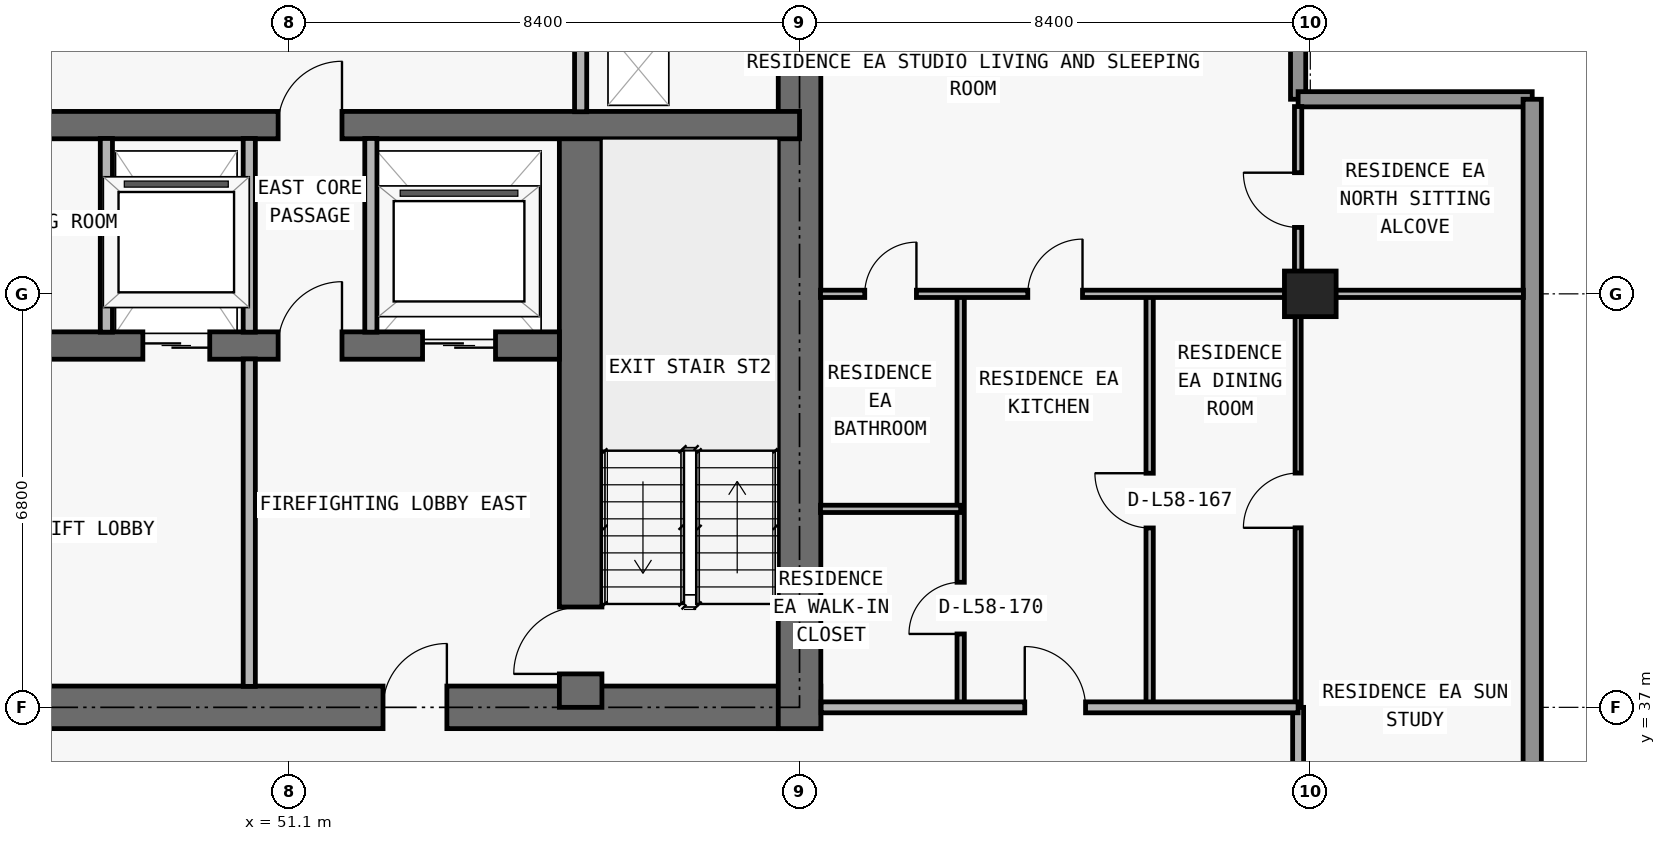
"""IFC4 building model, lengths in metres.
Left out: names, types, materials, properties, quantities, classifications, styles, units other than length and angle.
Written with IfcOpenShell. Run it as: python <this file> out.ifc"""

import sys

from ifc_helpers import new_model, si_unit, direction, frame, frame_2d, origin, origin_2d, place, context, subcontext, project, spatial, rectangle, extrude, element, fill, save


model = new_model("IFC4")
c1 = context("Model", 3, precision=1e-05, world=origin(), true_north=direction((0.0, 1.0)))
c2 = subcontext(c1, "Body", "Model", "MODEL_VIEW")
j1 = project(units=[si_unit("LENGTHUNIT", "METRE"), si_unit("PLANEANGLEUNIT", "RADIAN")], contexts=[c1])
p1 = place(None, origin())
s1 = spatial("IfcSite", under=j1, at=p1, CompositionType="ELEMENT")
p2 = place(p1, origin())
s2 = spatial("IfcBuilding", under=s1, at=p2, CompositionType="ELEMENT")
p3 = place(p2, frame((0.0, 0.0, 208.2)))
s3 = spatial("IfcBuildingStorey", under=s2, at=p3, CompositionType="ELEMENT", Elevation=208.2)
p4 = place(p3, frame((67.9, 43.8, 0.0), z_axis=(0.0, 0.0, 1.0), x_axis=(1.0, 0.0, 0.0)))
e1 = element("IfcColumn", 1, at=p4, inside=s3, PredefinedType="COLUMN", context=c2, shape_type="SweptSolid", body=[
    extrude(rectangle(XDim=0.85, YDim=0.75, at=origin_2d()), origin(), (0.0, 0.0, 1.0), 3.05),
])
p5 = place(p3, frame((17.95, 37.0, 0.0), z_axis=(0.0, 0.0, 1.0), x_axis=(1.0, 0.0, 0.0)))
e2 = element("IfcWall", 2, at=p5, inside=s3, PredefinedType="SHEAR", context=c2, shape_type="SweptSolid", body=[
    extrude(rectangle(XDim=41.9, YDim=0.7, at=frame_2d((20.95, 0.0))), origin(), (0.0, 0.0, 1.0), 3.05),
])
p6 = place(p5, frame((14.35, 0.0, 0.0)))
e3 = element("IfcOpeningElement", 3, at=p6, cuts=e2, PredefinedType="OPENING", context=c2, shape_type="SweptSolid", body=[
    extrude(rectangle(XDim=1.1, YDim=2.15, at=frame_2d((0.55, 1.075))), frame((0.0, 0.36, 0.0), z_axis=(0.0, -1.0, 0.0), x_axis=(1.0, 0.0, 0.0)), (0.0, 0.0, 1.0), 0.72),
])
p7 = place(p5, frame((6.2, 0.0, 0.0)))
e4 = element("IfcOpeningElement", 4, at=p7, cuts=e2, PredefinedType="OPENING", context=c2, shape_type="SweptSolid", body=[
    extrude(rectangle(XDim=1.05, YDim=2.15, at=frame_2d((0.525, 1.075))), frame((0.0, 0.36, 0.0), z_axis=(0.0, -1.0, 0.0), x_axis=(1.0, 0.0, 0.0)), (0.0, 0.0, 1.0), 0.72),
])
p8 = place(p5, frame((34.7, 0.0, 0.0)))
e5 = element("IfcOpeningElement", 5, at=p8, cuts=e2, PredefinedType="OPENING", context=c2, shape_type="SweptSolid", body=[
    extrude(rectangle(XDim=1.05, YDim=2.15, at=frame_2d((0.525, 1.075))), frame((0.0, 0.36, 0.0), z_axis=(0.0, -1.0, 0.0), x_axis=(1.0, 0.0, 0.0)), (0.0, 0.0, 1.0), 0.72),
])
p9 = place(p5, frame((10.812, 0.0, 0.0)))
e6 = element("IfcOpeningElement", 6, at=p9, cuts=e2, PredefinedType="OPENING", context=c2, shape_type="SweptSolid", body=[
    extrude(rectangle(XDim=1.05, YDim=2.15, at=frame_2d((0.525, 1.075))), frame((0.0, 0.36, 0.0), z_axis=(0.0, -1.0, 0.0), x_axis=(1.0, 0.0, 0.0)), (0.0, 0.0, 1.0), 0.72),
])
p10 = place(p5, frame((24.05, 0.0, 0.0)))
e7 = element("IfcOpeningElement", 7, at=p10, cuts=e2, PredefinedType="OPENING", context=c2, shape_type="SweptSolid", body=[
    extrude(rectangle(XDim=1.05, YDim=2.15, at=frame_2d((0.525, 1.075))), frame((0.0, 0.36, 0.0), z_axis=(0.0, -1.0, 0.0), x_axis=(1.0, 0.0, 0.0)), (0.0, 0.0, 1.0), 0.72),
])
p11 = place(p3, frame((59.5, 36.65, 0.0), z_axis=(0.0, 0.0, 1.0), x_axis=(0.0, 1.0, 0.0)))
e8 = element("IfcWall", 8, at=p11, inside=s3, PredefinedType="SHEAR", context=c2, shape_type="SweptSolid", body=[
    extrude(rectangle(XDim=13.95, YDim=0.7, at=frame_2d((6.975, 0.0))), origin(), (0.0, 0.0, 1.0), 3.05),
])
p12 = place(p3, frame((55.9, 37.0, 0.0), z_axis=(0.0, 0.0, 1.0), x_axis=(0.0, 1.0, 0.0)))
e9 = element("IfcWall", 9, at=p12, inside=s3, PredefinedType="SHEAR", context=c2, shape_type="SweptSolid", body=[
    extrude(rectangle(XDim=9.575, YDim=0.7, at=frame_2d((4.788, 0.0))), origin(), (0.0, 0.0, 1.0), 3.05),
])
p13 = place(p12, frame((0.55, 0.0, 0.0)))
e10 = element("IfcOpeningElement", 10, at=p13, cuts=e9, PredefinedType="OPENING", context=c2, shape_type="SweptSolid", body=[
    extrude(rectangle(XDim=1.1, YDim=2.15, at=frame_2d((0.55, 1.075))), frame((0.0, 0.36, 0.0), z_axis=(0.0, -1.0, 0.0), x_axis=(1.0, 0.0, 0.0)), (0.0, 0.0, 1.0), 0.72),
])
p14 = place(p3, frame((22.25, 42.95, 0.0), z_axis=(0.0, 0.0, 1.0), x_axis=(1.0, 0.0, 0.0)))
e11 = element("IfcWall", 11, at=p14, inside=s3, PredefinedType="SHEAR", context=c2, shape_type="SweptSolid", body=[
    extrude(rectangle(XDim=33.3, YDim=0.45, at=frame_2d((16.65, 0.0))), origin(), (0.0, 0.0, 1.0), 3.05),
])
p15 = place(p14, frame((1.05, 0.0, 0.0)))
e12 = element("IfcOpeningElement", 12, at=p15, cuts=e11, PredefinedType="OPENING", context=c2, shape_type="SweptSolid", body=[
    extrude(rectangle(XDim=1.2, YDim=2.2, at=frame_2d((0.6, 1.1))), frame((0.0, 0.235, 0.0), z_axis=(0.0, -1.0, 0.0), x_axis=(1.0, 0.0, 0.0)), (0.0, 0.0, 1.0), 0.47),
])
p16 = place(p14, frame((31.05, 0.0, 0.0)))
e13 = element("IfcOpeningElement", 13, at=p16, cuts=e11, PredefinedType="OPENING", context=c2, shape_type="SweptSolid", body=[
    extrude(rectangle(XDim=1.2, YDim=2.2, at=frame_2d((0.6, 1.1))), frame((0.0, 0.235, 0.0), z_axis=(0.0, -1.0, 0.0), x_axis=(1.0, 0.0, 0.0)), (0.0, 0.0, 1.0), 0.47),
])
p17 = place(p14, frame((26.45, 0.0, 0.0)))
e14 = element("IfcOpeningElement", 14, at=p17, cuts=e11, PredefinedType="OPENING", context=c2, shape_type="SweptSolid", body=[
    extrude(rectangle(XDim=1.1, YDim=2.2, at=frame_2d((0.55, 1.1))), frame((0.0, 0.235, 0.0), z_axis=(0.0, -1.0, 0.0), x_axis=(1.0, 0.0, 0.0)), (0.0, 0.0, 1.0), 0.47),
])
p18 = place(p14, frame((5.95, 0.0, 0.0)))
e15 = element("IfcOpeningElement", 15, at=p18, cuts=e11, PredefinedType="OPENING", context=c2, shape_type="SweptSolid", body=[
    extrude(rectangle(XDim=1.1, YDim=2.2, at=frame_2d((0.55, 1.1))), frame((0.0, 0.235, 0.0), z_axis=(0.0, -1.0, 0.0), x_axis=(1.0, 0.0, 0.0)), (0.0, 0.0, 1.0), 0.47),
])
p19 = place(p14, frame((3.625, 0.0, 0.0)))
e16 = element("IfcOpeningElement", 16, at=p19, cuts=e11, PredefinedType="OPENING", context=c2, shape_type="SweptSolid", body=[
    extrude(rectangle(XDim=1.05, YDim=2.15, at=frame_2d((0.525, 1.075))), frame((0.0, 0.235, 0.0), z_axis=(0.0, -1.0, 0.0), x_axis=(1.0, 0.0, 0.0)), (0.0, 0.0, 1.0), 0.47),
])
p20 = place(p14, frame((28.675, 0.0, 0.0)))
e17 = element("IfcOpeningElement", 17, at=p20, cuts=e11, PredefinedType="OPENING", context=c2, shape_type="SweptSolid", body=[
    extrude(rectangle(XDim=1.05, YDim=2.15, at=frame_2d((0.525, 1.075))), frame((0.0, 0.235, 0.0), z_axis=(0.0, -1.0, 0.0), x_axis=(1.0, 0.0, 0.0)), (0.0, 0.0, 1.0), 0.47),
])
p21 = place(p14, frame((15.225, 0.0, 0.0)))
e18 = element("IfcOpeningElement", 18, at=p21, cuts=e11, PredefinedType="OPENING", context=c2, shape_type="SweptSolid", body=[
    extrude(rectangle(XDim=1.0, YDim=2.2, at=frame_2d((0.5, 1.1))), frame((0.0, 0.235, 0.0), z_axis=(0.0, -1.0, 0.0), x_axis=(1.0, 0.0, 0.0)), (0.0, 0.0, 1.0), 0.47),
])
p22 = place(p14, frame((21.975, 0.0, 0.0)))
e19 = element("IfcOpeningElement", 19, at=p22, cuts=e11, PredefinedType="OPENING", context=c2, shape_type="SweptSolid", body=[
    extrude(rectangle(XDim=1.0, YDim=2.2, at=frame_2d((0.5, 1.1))), frame((0.0, 0.235, 0.0), z_axis=(0.0, -1.0, 0.0), x_axis=(1.0, 0.0, 0.0)), (0.0, 0.0, 1.0), 0.47),
])
p23 = place(p3, frame((18.3, 46.575, 0.0), z_axis=(0.0, 0.0, 1.0), x_axis=(1.0, 0.0, 0.0)))
e20 = element("IfcWall", 20, at=p23, inside=s3, PredefinedType="SHEAR", context=c2, shape_type="SweptSolid", body=[
    extrude(rectangle(XDim=41.2, YDim=0.45, at=frame_2d((20.6, 0.0))), origin(), (0.0, 0.0, 1.0), 3.05),
])
p24 = place(p23, frame((7.575, 0.0, 0.0)))
e21 = element("IfcOpeningElement", 21, at=p24, cuts=e20, PredefinedType="OPENING", context=c2, shape_type="SweptSolid", body=[
    extrude(rectangle(XDim=1.05, YDim=2.15, at=frame_2d((0.525, 1.075))), frame((0.0, 0.235, 0.0), z_axis=(0.0, -1.0, 0.0), x_axis=(1.0, 0.0, 0.0)), (0.0, 0.0, 1.0), 0.47),
])
p25 = place(p23, frame((32.625, 0.0, 0.0)))
e22 = element("IfcOpeningElement", 22, at=p25, cuts=e20, PredefinedType="OPENING", context=c2, shape_type="SweptSolid", body=[
    extrude(rectangle(XDim=1.05, YDim=2.15, at=frame_2d((0.525, 1.075))), frame((0.0, 0.235, 0.0), z_axis=(0.0, -1.0, 0.0), x_axis=(1.0, 0.0, 0.0)), (0.0, 0.0, 1.0), 0.47),
])
p26 = place(p3, frame((67.7, 50.45, 0.0), z_axis=(0.0, 0.0, 1.0), x_axis=(0.0, -1.0, 0.0)))
e23 = element("IfcWall", 23, at=p26, inside=s3, PredefinedType="ELEMENTEDWALL", context=c2, shape_type="SweptSolid", body=[
    extrude(rectangle(XDim=3.45, YDim=0.25, at=frame_2d((1.725, 0.0))), origin(), (0.0, 0.0, 1.0), 3.05),
])
p27 = place(p3, frame((67.7, 47.0, 0.0), z_axis=(0.0, 0.0, 1.0), x_axis=(1.0, 0.0, 0.0)))
e24 = element("IfcWall", 24, at=p27, inside=s3, PredefinedType="ELEMENTEDWALL", context=c2, shape_type="SweptSolid", body=[
    extrude(rectangle(XDim=3.85, YDim=0.25, at=frame_2d((1.925, 0.0))), origin(), (0.0, 0.0, 1.0), 3.05),
])
p28 = place(p3, frame((71.55, 47.0, 0.0), z_axis=(0.0, 0.0, 1.0), x_axis=(0.0, -1.0, 0.0)))
e25 = element("IfcWall", 25, at=p28, inside=s3, PredefinedType="STANDARD", context=c2, shape_type="SweptSolid", body=[
    extrude(rectangle(XDim=17.9, YDim=0.3, at=frame_2d((8.95, 0.0))), origin(), (0.0, 0.0, 1.0), 3.05),
])
p29 = place(p3, frame((48.1, 43.17, 0.0), z_axis=(0.0, 0.0, 1.0), x_axis=(0.0, 1.0, 0.0)))
e26 = element("IfcWall", 26, at=p29, inside=s3, PredefinedType="PARTITIONING", context=c2, shape_type="SweptSolid", body=[
    extrude(rectangle(XDim=3.185, YDim=0.2, at=frame_2d((1.593, 0.0))), origin(), (0.0, 0.0, 1.0), 3.05),
])
p30 = place(p3, frame((50.45, 37.345, 0.0), z_axis=(0.0, 0.0, 1.0), x_axis=(0.0, 1.0, 0.0)))
e27 = element("IfcWall", 27, at=p30, inside=s3, PredefinedType="PARTITIONING", context=c2, shape_type="SweptSolid", body=[
    extrude(rectangle(XDim=5.385, YDim=0.2, at=frame_2d((2.692, 0.0))), origin(), (0.0, 0.0, 1.0), 3.05),
])
for number, where, z_axis, x_axis in (
    (28, (50.45, 43.17, 0.0), (0.0, 0.0, 1.0), (0.0, 1.0, 0.0)),
    (29, (52.45, 43.17, 0.0), (0.0, 0.0, 1.0), (0.0, 1.0, 0.0)),
):
    element("IfcWall", number, at=place(p3, frame(where, z_axis=z_axis, x_axis=x_axis)), inside=s3, PredefinedType="PARTITIONING", context=c2, shape_type="SweptSolid", body=[
        extrude(rectangle(XDim=3.185, YDim=0.2, at=frame_2d((1.593, 0.0))), origin(), (0.0, 0.0, 1.0), 3.05),
    ])
p31 = place(p3, frame((55.9, 46.795, 0.0), z_axis=(0.0, 0.0, 1.0), x_axis=(0.0, 1.0, 0.0)))
e30 = element("IfcWall", 30, at=p31, inside=s3, PredefinedType="PARTITIONING", context=c2, shape_type="SweptSolid", body=[
    extrude(rectangle(XDim=3.16, YDim=0.2, at=frame_2d((1.58, 0.0))), origin(), (0.0, 0.0, 1.0), 3.05),
])
p32 = place(p3, frame((62.15, 37.0, 0.0), z_axis=(0.0, 0.0, 1.0), x_axis=(0.0, 1.0, 0.0)))
e31 = element("IfcWall", 31, at=p32, inside=s3, PredefinedType="PARTITIONING", context=c2, shape_type="SweptSolid", body=[
    extrude(rectangle(XDim=6.8, YDim=0.12, at=frame_2d((3.4, 0.0))), origin(), (0.0, 0.0, 1.0), 3.05),
])
p33 = place(p32, frame((1.207, 0.0, 0.0)))
e32 = element("IfcOpeningElement", 32, at=p33, cuts=e31, PredefinedType="OPENING", context=c2, shape_type="SweptSolid", body=[
    extrude(rectangle(XDim=0.85, YDim=2.1, at=frame_2d((0.425, 1.05))), frame((0.0, 0.07, 0.0), z_axis=(0.0, -1.0, 0.0), x_axis=(1.0, 0.0, 0.0)), (0.0, 0.0, 1.0), 0.14),
])
p34 = place(p3, frame((65.258, 37.0, 0.0), z_axis=(0.0, 0.0, 1.0), x_axis=(0.0, 1.0, 0.0)))
e33 = element("IfcWall", 33, at=p34, inside=s3, PredefinedType="PARTITIONING", context=c2, shape_type="SweptSolid", body=[
    extrude(rectangle(XDim=6.8, YDim=0.12, at=frame_2d((3.4, 0.0))), origin(), (0.0, 0.0, 1.0), 3.05),
])
p35 = place(p34, frame((2.95, 0.0, 0.0)))
e34 = element("IfcOpeningElement", 34, at=p35, cuts=e33, PredefinedType="OPENING", context=c2, shape_type="SweptSolid", body=[
    extrude(rectangle(XDim=0.9, YDim=2.15, at=frame_2d((0.45, 1.075))), frame((0.0, 0.07, 0.0), z_axis=(0.0, -1.0, 0.0), x_axis=(1.0, 0.0, 0.0)), (0.0, 0.0, 1.0), 0.14),
])
p36 = place(p3, frame((67.7, 34.005, 0.0), z_axis=(0.0, 0.0, 1.0), x_axis=(0.0, 1.0, 0.0)))
e35 = element("IfcWall", 35, at=p36, inside=s3, PredefinedType="PARTITIONING", context=c2, shape_type="SweptSolid", body=[
    extrude(rectangle(XDim=2.995, YDim=0.18, at=frame_2d((1.498, 0.0))), origin(), (0.0, 0.0, 1.0), 2.263),
])
p37 = place(p3, frame((67.7, 37.005, 0.0), z_axis=(0.0, 0.0, 1.0), x_axis=(0.0, 1.0, 0.0)))
e36 = element("IfcWall", 36, at=p37, inside=s3, PredefinedType="MOVABLE", context=c2, shape_type="SweptSolid", body=[
    extrude(rectangle(XDim=6.795, YDim=0.1, at=frame_2d((3.397, 0.0))), origin(), (0.0, 0.0, 1.0), 2.263),
])
p38 = place(p37, frame((2.948, 0.0, 0.0)))
e37 = element("IfcOpeningElement", 37, at=p38, cuts=e36, PredefinedType="OPENING", context=c2, shape_type="SweptSolid", body=[
    extrude(rectangle(XDim=0.9, YDim=2.15, at=frame_2d((0.45, 1.075))), frame((0.0, 0.06, 0.0), z_axis=(0.0, -1.0, 0.0), x_axis=(1.0, 0.0, 0.0)), (0.0, 0.0, 1.0), 0.12),
])
p39 = place(p3, frame((67.7, 43.805, 0.0), z_axis=(0.0, 0.0, 1.0), x_axis=(0.0, 1.0, 0.0)))
e38 = element("IfcWall", 38, at=p39, inside=s3, PredefinedType="PARTITIONING", context=c2, shape_type="SweptSolid", body=[
    extrude(rectangle(XDim=3.075, YDim=0.12, at=frame_2d((1.538, 0.0))), origin(), (0.0, 0.0, 1.0), 3.05),
])
p40 = place(p39, frame((1.087, 0.0, 0.0)))
e39 = element("IfcOpeningElement", 39, at=p40, cuts=e38, PredefinedType="OPENING", context=c2, shape_type="SweptSolid", body=[
    extrude(rectangle(XDim=0.9, YDim=2.15, at=frame_2d((0.45, 1.075))), frame((0.0, 0.07, 0.0), z_axis=(0.0, -1.0, 0.0), x_axis=(1.0, 0.0, 0.0)), (0.0, 0.0, 1.0), 0.14),
])
p41 = place(p3, frame((59.855, 37.0, 0.0), z_axis=(0.0, 0.0, 1.0), x_axis=(1.0, 0.0, 0.0)))
e40 = element("IfcWall", 40, at=p41, inside=s3, PredefinedType="PARTITIONING", context=c2, shape_type="SweptSolid", body=[
    extrude(rectangle(XDim=7.845, YDim=0.18, at=frame_2d((3.922, 0.0))), origin(), (0.0, 0.0, 1.0), 3.05),
])
p42 = place(p41, frame((3.349, 0.0, 0.0)))
e41 = element("IfcOpeningElement", 41, at=p42, cuts=e40, PredefinedType="OPENING", context=c2, shape_type="SweptSolid", body=[
    extrude(rectangle(XDim=1.0, YDim=2.2, at=frame_2d((0.5, 1.1))), frame((0.0, 0.1, 0.0), z_axis=(0.0, -1.0, 0.0), x_axis=(1.0, 0.0, 0.0)), (0.0, 0.0, 1.0), 0.2),
])
p43 = place(p3, frame((59.845, 40.264, 0.0), z_axis=(0.0, 0.0, 1.0), x_axis=(1.0, 0.0, 0.0)))
e42 = element("IfcWall", 42, at=p43, inside=s3, PredefinedType="PARTITIONING", context=c2, shape_type="SweptSolid", body=[
    extrude(rectangle(XDim=2.305, YDim=0.12, at=frame_2d((1.152, 0.0))), origin(), (0.0, 0.0, 1.0), 3.05),
])
p44 = place(p3, frame((59.845, 43.8, 0.0), z_axis=(0.0, 0.0, 1.0), x_axis=(1.0, 0.0, 0.0)))
e43 = element("IfcWall", 43, at=p44, inside=s3, PredefinedType="PARTITIONING", context=c2, shape_type="SweptSolid", body=[
    extrude(rectangle(XDim=11.56, YDim=0.12, at=frame_2d((5.78, 0.0))), origin(), (0.0, 0.0, 1.0), 2.418),
])
p45 = place(p44, frame((3.409, 0.0, 0.0)))
e44 = element("IfcOpeningElement", 44, at=p45, cuts=e43, PredefinedType="OPENING", context=c2, shape_type="SweptSolid", body=[
    extrude(rectangle(XDim=0.9, YDim=2.15, at=frame_2d((0.45, 1.075))), frame((0.0, 0.07, 0.0), z_axis=(0.0, -1.0, 0.0), x_axis=(1.0, 0.0, 0.0)), (0.0, 0.0, 1.0), 0.14),
])
p46 = place(p44, frame((0.728, 0.0, 0.0)))
e45 = element("IfcOpeningElement", 45, at=p46, cuts=e43, PredefinedType="OPENING", context=c2, shape_type="SweptSolid", body=[
    extrude(rectangle(XDim=0.85, YDim=2.1, at=frame_2d((0.425, 1.05))), frame((0.0, 0.07, 0.0), z_axis=(0.0, -1.0, 0.0), x_axis=(1.0, 0.0, 0.0)), (0.0, 0.0, 1.0), 0.14),
])
p47 = place(p16, origin())
e46 = element("IfcDoor", 46, at=p47, inside=s3, OperationType="DOUBLE_DOOR_SLIDING", PredefinedType="DOOR", context=c2, shape_type="SweptSolid", body=[
    extrude(rectangle(XDim=1.2, YDim=2.2, at=frame_2d((0.6, 1.1))), frame((0.0, 0.025, 0.0), z_axis=(0.0, -1.0, 0.0), x_axis=(1.0, 0.0, 0.0)), (0.0, 0.0, 1.0), 0.05),
])
fill(e13, e46)
p48 = place(p17, origin())
e47 = element("IfcDoor", 47, at=p48, inside=s3, OperationType="DOUBLE_DOOR_SLIDING", PredefinedType="DOOR", context=c2, shape_type="SweptSolid", body=[
    extrude(rectangle(XDim=1.1, YDim=2.2, at=frame_2d((0.55, 1.1))), frame((0.0, 0.025, 0.0), z_axis=(0.0, -1.0, 0.0), x_axis=(1.0, 0.0, 0.0)), (0.0, 0.0, 1.0), 0.05),
])
fill(e14, e47)
p49 = place(p8, origin())
e48 = element("IfcDoor", 48, at=p49, inside=s3, OperationType="SINGLE_SWING_RIGHT", PredefinedType="DOOR", context=c2, shape_type="SweptSolid", body=[
    extrude(rectangle(XDim=1.05, YDim=2.15, at=frame_2d((0.525, 1.075))), frame((0.0, 0.025, 0.0), z_axis=(0.0, -1.0, 0.0), x_axis=(1.0, 0.0, 0.0)), (0.0, 0.0, 1.0), 0.05),
])
fill(e5, e48)
p50 = place(p13, origin())
e49 = element("IfcDoor", 49, at=p50, inside=s3, OperationType="SINGLE_SWING_LEFT", PredefinedType="DOOR", context=c2, shape_type="SweptSolid", body=[
    extrude(rectangle(XDim=1.1, YDim=2.15, at=frame_2d((0.55, 1.075))), frame((0.0, 0.025, 0.0), z_axis=(0.0, -1.0, 0.0), x_axis=(1.0, 0.0, 0.0)), (0.0, 0.0, 1.0), 0.05),
])
fill(e10, e49)
p51 = place(p20, origin())
e50 = element("IfcDoor", 50, at=p51, inside=s3, OperationType="SINGLE_SWING_RIGHT", PredefinedType="DOOR", context=c2, shape_type="SweptSolid", body=[
    extrude(rectangle(XDim=1.05, YDim=2.15, at=frame_2d((0.525, 1.075))), frame((0.0, 0.025, 0.0), z_axis=(0.0, -1.0, 0.0), x_axis=(1.0, 0.0, 0.0)), (0.0, 0.0, 1.0), 0.05),
])
fill(e17, e50)
p52 = place(p25, origin())
e51 = element("IfcDoor", 51, at=p52, inside=s3, OperationType="SINGLE_SWING_RIGHT", PredefinedType="DOOR", context=c2, shape_type="SweptSolid", body=[
    extrude(rectangle(XDim=1.05, YDim=2.15, at=frame_2d((0.525, 1.075))), frame((0.0, 0.025, 0.0), z_axis=(0.0, -1.0, 0.0), x_axis=(1.0, 0.0, 0.0)), (0.0, 0.0, 1.0), 0.05),
])
fill(e22, e51)
p53 = place(p35, origin())
e52 = element("IfcDoor", 52, at=p53, inside=s3, OperationType="SINGLE_SWING_RIGHT", PredefinedType="DOOR", context=c2, shape_type="SweptSolid", body=[
    extrude(rectangle(XDim=0.9, YDim=2.15, at=frame_2d((0.45, 1.075))), frame((0.0, 0.025, 0.0), z_axis=(0.0, -1.0, 0.0), x_axis=(1.0, 0.0, 0.0)), (0.0, 0.0, 1.0), 0.05),
])
fill(e34, e52)
p54 = place(p42, origin())
e53 = element("IfcDoor", 53, at=p54, inside=s3, OperationType="SINGLE_SWING_LEFT", PredefinedType="DOOR", context=c2, shape_type="SweptSolid", body=[
    extrude(rectangle(XDim=1.0, YDim=2.2, at=frame_2d((0.5, 1.1))), frame((0.0, 0.025, 0.0), z_axis=(0.0, -1.0, 0.0), x_axis=(1.0, 0.0, 0.0)), (0.0, 0.0, 1.0), 0.05),
])
fill(e41, e53)
p55 = place(p45, origin())
e54 = element("IfcDoor", 54, at=p55, inside=s3, OperationType="SINGLE_SWING_RIGHT", PredefinedType="DOOR", context=c2, shape_type="SweptSolid", body=[
    extrude(rectangle(XDim=0.9, YDim=2.15, at=frame_2d((0.45, 1.075))), frame((0.0, 0.025, 0.0), z_axis=(0.0, -1.0, 0.0), x_axis=(1.0, 0.0, 0.0)), (0.0, 0.0, 1.0), 0.05),
])
fill(e44, e54)
p56 = place(p33, origin())
e55 = element("IfcDoor", 55, at=p56, inside=s3, OperationType="SINGLE_SWING_LEFT", PredefinedType="DOOR", context=c2, shape_type="SweptSolid", body=[
    extrude(rectangle(XDim=0.85, YDim=2.1, at=frame_2d((0.425, 1.05))), frame((0.0, 0.025, 0.0), z_axis=(0.0, -1.0, 0.0), x_axis=(1.0, 0.0, 0.0)), (0.0, 0.0, 1.0), 0.05),
])
fill(e32, e55)
p57 = place(p46, origin())
e56 = element("IfcDoor", 56, at=p57, inside=s3, OperationType="SINGLE_SWING_RIGHT", PredefinedType="DOOR", context=c2, shape_type="SweptSolid", body=[
    extrude(rectangle(XDim=0.85, YDim=2.1, at=frame_2d((0.425, 1.05))), frame((0.0, 0.025, 0.0), z_axis=(0.0, -1.0, 0.0), x_axis=(1.0, 0.0, 0.0)), (0.0, 0.0, 1.0), 0.05),
])
fill(e45, e56)
p58 = place(p38, origin())
e57 = element("IfcDoor", 57, at=p58, inside=s3, OperationType="SINGLE_SWING_LEFT", PredefinedType="DOOR", context=c2, shape_type="SweptSolid", body=[
    extrude(rectangle(XDim=0.9, YDim=2.15, at=frame_2d((0.45, 1.075))), frame((0.0, 0.025, 0.0), z_axis=(0.0, -1.0, 0.0), x_axis=(1.0, 0.0, 0.0)), (0.0, 0.0, 1.0), 0.05),
])
fill(e37, e57)
p59 = place(p40, origin())
e58 = element("IfcDoor", 58, at=p59, inside=s3, OperationType="SINGLE_SWING_RIGHT", PredefinedType="DOOR", context=c2, shape_type="SweptSolid", body=[
    extrude(rectangle(XDim=0.9, YDim=2.15, at=frame_2d((0.45, 1.075))), frame((0.0, 0.025, 0.0), z_axis=(0.0, -1.0, 0.0), x_axis=(1.0, 0.0, 0.0)), (0.0, 0.0, 1.0), 0.05),
])
fill(e39, e58)
save(model, sys.argv[1])
